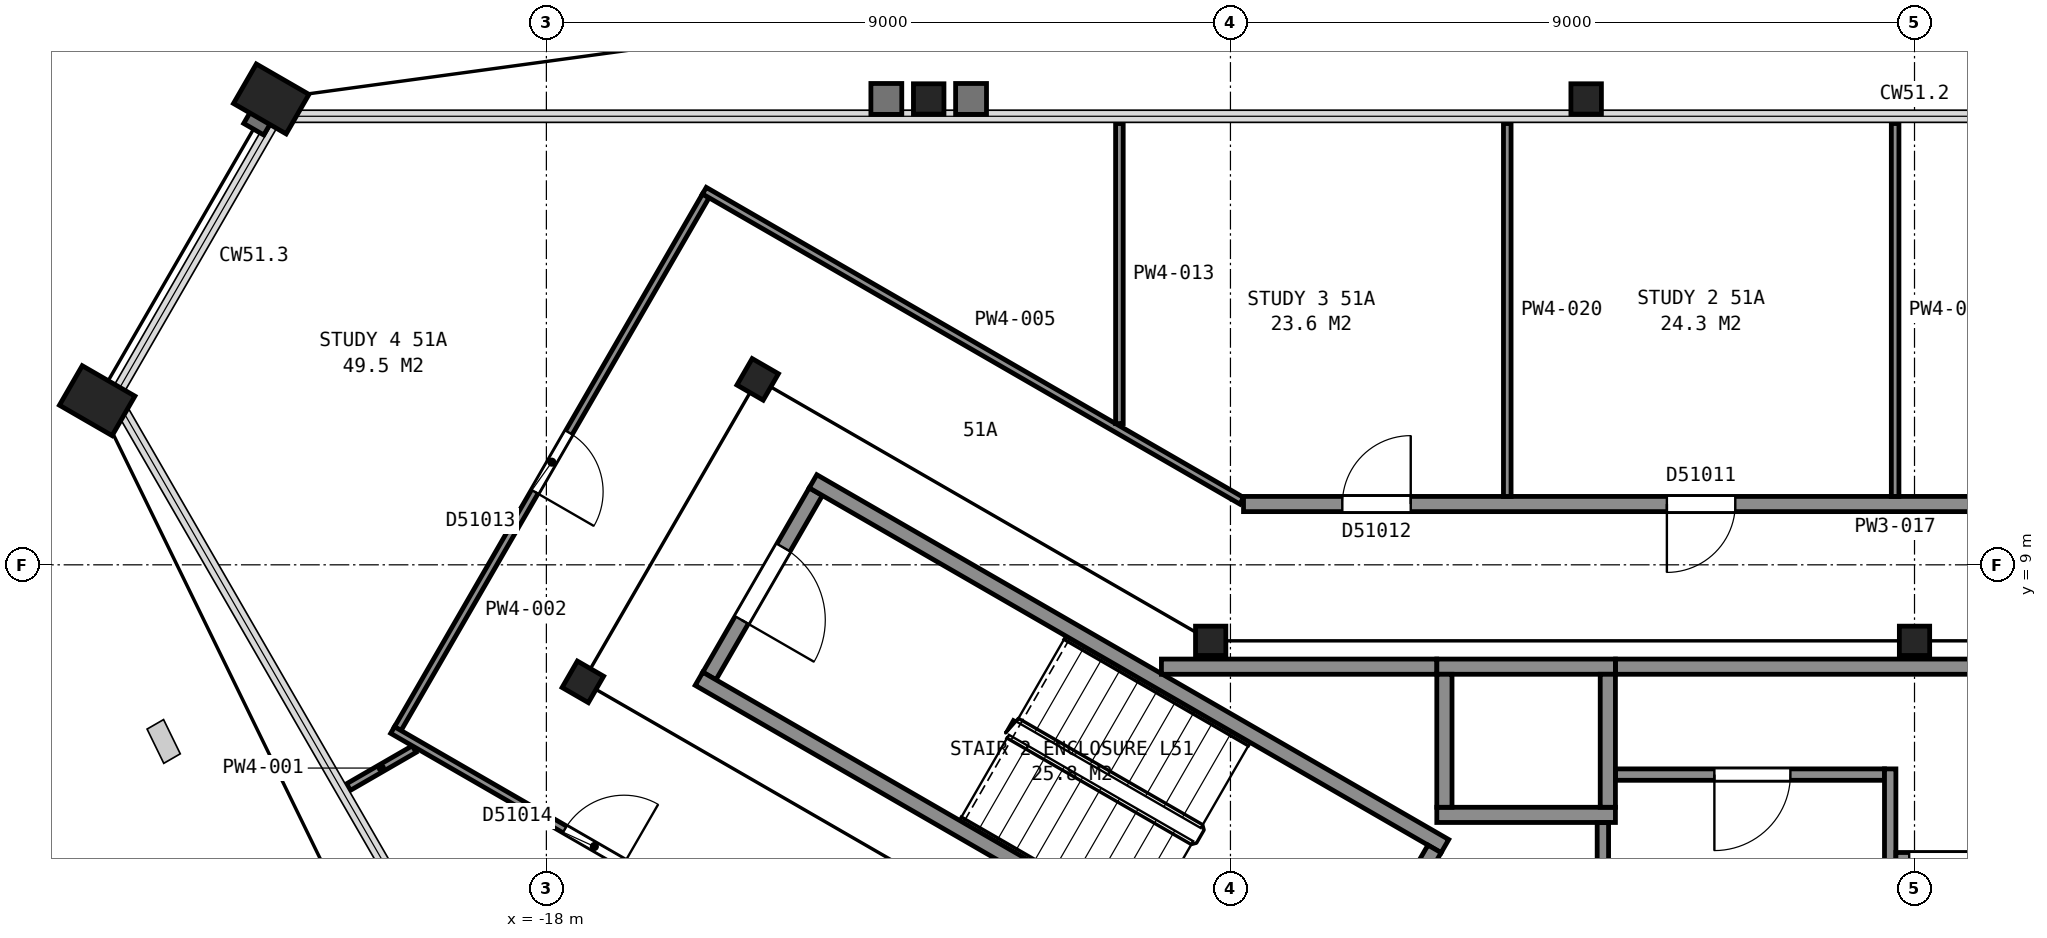
"""IFC4 building model, lengths in metres.
Left out: names, types, materials, properties, quantities, classifications, styles, units other than length and angle.
Written with IfcOpenShell. Run it as: python <this file> out.ifc"""

import sys

from ifc_helpers import new_model, si_unit, direction, frame, frame_2d, origin, origin_2d, place, context, subcontext, project, spatial, rectangle, hollow_rectangle, i_section, extrude, element, fill, save


model = new_model("IFC4")
c1 = context("Model", 3, precision=1e-05, world=origin(), true_north=direction((0.0, 1.0)))
c2 = subcontext(c1, "Body", "Model", "MODEL_VIEW")
j1 = project(units=[si_unit("LENGTHUNIT", "METRE"), si_unit("PLANEANGLEUNIT", "RADIAN")], contexts=[c1])
p1 = place(None, origin())
s1 = spatial("IfcSite", under=j1, at=p1, CompositionType="ELEMENT")
p2 = place(p1, origin())
s2 = spatial("IfcBuilding", under=s1, at=p2, CompositionType="ELEMENT")
p3 = place(p2, frame((0.0, 0.0, 206.4)))
s3 = spatial("IfcBuildingStorey", under=s2, at=p3, CompositionType="ELEMENT", Elevation=206.4)
for number, where, z_axis, x_axis in (
    (1, (-4.32, 15.13, 0.0), (0.0, 0.0, 1.0), (1.0, 0.0, 0.0)),
    (2, (-12.97, 15.13, 0.0), (0.0, 0.0, 1.0), (1.0, 0.0, 0.0)),
):
    element("IfcColumn", number, at=place(p3, frame(where, z_axis=z_axis, x_axis=x_axis)), inside=s3, PredefinedType="COLUMN", context=c2, shape_type="SweptSolid", body=[
        extrude(i_section(OverallWidth=0.401, OverallDepth=0.399, WebThickness=0.025, FlangeThickness=0.04, FilletRadius=0.015, at=origin_2d()), origin(), (0.0, 0.0, 1.0), 3.7),
    ])
for number, where, z_axis, x_axis in (
    (3, (-21.62, 15.13, 0.0), (0.0, 0.0, 1.0), (0.5, 0.866, 0.0)),
    (4, (-23.91, 11.16, 0.0), (0.0, 0.0, 1.0), (0.5, 0.866, 0.0)),
):
    element("IfcColumn", number, at=place(p3, frame(where, z_axis=z_axis, x_axis=x_axis)), inside=s3, PredefinedType="COLUMN", context=c2, shape_type="SweptSolid", body=[
        extrude(hollow_rectangle(XDim=0.6, YDim=0.8, WallThickness=0.05, at=origin_2d()), origin(), (0.0, 0.0, 1.0), 3.7),
    ])
for number, where, z_axis, x_axis in (
    (5, (0.0, 8.0, 0.0), (0.0, 0.0, 1.0), (1.0, 0.0, 0.0)),
    (6, (-9.26, 8.0, 0.0), (0.0, 0.0, 1.0), (1.0, 0.0, 0.0)),
):
    element("IfcColumn", number, at=place(p3, frame(where, z_axis=z_axis, x_axis=x_axis)), inside=s3, PredefinedType="COLUMN", context=c2, shape_type="SweptSolid", body=[
        extrude(i_section(OverallWidth=0.399, OverallDepth=0.386, WebThickness=0.021, FlangeThickness=0.033, FilletRadius=0.015, at=origin_2d()), origin(), (0.0, 0.0, 1.0), 3.7),
    ])
for number, where, z_axis, x_axis in (
    (7, (-15.22, 11.44, 0.0), (0.0, 0.0, 1.0), (0.5, 0.866, 0.0)),
    (8, (-17.52, 7.46, 0.0), (0.0, 0.0, 1.0), (0.5, 0.866, 0.0)),
):
    element("IfcColumn", number, at=place(p3, frame(where, z_axis=z_axis, x_axis=x_axis)), inside=s3, PredefinedType="COLUMN", context=c2, shape_type="SweptSolid", body=[
        extrude(i_section(OverallWidth=0.401, OverallDepth=0.399, WebThickness=0.025, FlangeThickness=0.04, FilletRadius=0.015, at=origin_2d()), origin(), (0.0, 0.0, 1.0), 3.7),
    ])
p4 = place(p3, frame((-14.455, 9.962, 0.0), z_axis=(0.0, 0.0, 1.0), x_axis=(-0.500049511043, -0.865996816683, 0.0)))
e9 = element("IfcWall", 9, at=p4, inside=s3, PredefinedType="PARTITIONING", context=c2, shape_type="SweptSolid", body=[
    extrude(rectangle(XDim=2.8, YDim=0.2, at=frame_2d((1.4, 0.0))), origin(), (0.0, 0.0, 1.0), 3.45),
])
p5 = place(p4, frame((0.85, 0.0, 0.0)))
e10 = element("IfcOpeningElement", 10, at=p5, cuts=e9, PredefinedType="OPENING", context=c2, shape_type="SweptSolid", body=[
    extrude(rectangle(XDim=1.1, YDim=2.1, at=frame_2d((0.55, 1.05))), frame((0.0, 0.11, 0.0), z_axis=(0.0, -1.0, 0.0), x_axis=(1.0, 0.0, 0.0)), (0.0, 0.0, 1.0), 0.22),
])
for number, where, z_axis, x_axis in (
    (11, (-7.678, 2.701, 0.0), (0.0, 0.0, 1.0), (-0.866, 0.5, 0.0)),
    (12, (-6.178, 5.299, 0.0), (0.0, 0.0, 1.0), (-0.866, 0.5, 0.0)),
):
    element("IfcWall", number, at=place(p3, frame(where, z_axis=z_axis, x_axis=x_axis)), inside=s3, PredefinedType="PARTITIONING", context=c2, shape_type="SweptSolid", body=[
        extrude(rectangle(XDim=9.6, YDim=0.2, at=frame_2d((4.8, 0.0))), origin(), (0.0, 0.0, 1.0), 3.45),
    ])
p6 = place(p3, frame((-6.315, 5.262, 0.0), z_axis=(0.0, 0.0, 1.0), x_axis=(-0.500049511043, -0.865996816683, 0.0)))
e13 = element("IfcWall", 13, at=p6, inside=s3, PredefinedType="PARTITIONING", context=c2, shape_type="SweptSolid", body=[
    extrude(rectangle(XDim=2.8, YDim=0.2, at=frame_2d((1.4, 0.0))), origin(), (0.0, 0.0, 1.0), 3.45),
])
for number, where, z_axis, x_axis in (
    (14, (-6.285, 5.71, 0.0), (0.0, 0.0, 1.0), (1.0, 0.0, 0.0)),
    (15, (-6.285, 7.66, 0.0), (0.0, 0.0, 1.0), (1.0, 0.0, 0.0)),
):
    element("IfcWall", number, at=place(p3, frame(where, z_axis=z_axis, x_axis=x_axis)), inside=s3, PredefinedType="PARTITIONING", context=c2, shape_type="SweptSolid", body=[
        extrude(rectangle(XDim=2.35, YDim=0.2, at=frame_2d((1.175, 0.0))), origin(), (0.0, 0.0, 1.0), 3.7),
    ])
for number, where, z_axis, x_axis in (
    (16, (-4.035, 5.81, 0.0), (0.0, 0.0, 1.0), (0.0, 1.0, 0.0)),
    (17, (-6.185, 5.81, 0.0), (0.0, 0.0, 1.0), (0.0, 1.0, 0.0)),
):
    element("IfcWall", number, at=place(p3, frame(where, z_axis=z_axis, x_axis=x_axis)), inside=s3, PredefinedType="PARTITIONING", context=c2, shape_type="SweptSolid", body=[
        extrude(rectangle(XDim=1.75, YDim=0.2, at=frame_2d((0.875, 0.0))), origin(), (0.0, 0.0, 1.0), 3.7),
    ])
p7 = place(p3, frame((-9.908, 7.66, 0.0), z_axis=(0.0, 0.0, 1.0), x_axis=(1.0, 0.0, 0.0)))
e18 = element("IfcWall", 18, at=p7, inside=s3, PredefinedType="PARTITIONING", context=c2, shape_type="SweptSolid", body=[
    extrude(rectangle(XDim=3.621, YDim=0.2, at=frame_2d((1.811, 0.0))), origin(), (0.0, 0.0, 1.0), 3.45),
])
p8 = place(p3, frame((-4.1, 2.085, 0.0), z_axis=(0.0, 0.0, 1.0), x_axis=(0.0, 1.0, 0.0)))
e19 = element("IfcWall", 19, at=p8, inside=s3, PredefinedType="PARTITIONING", context=c2, shape_type="SweptSolid", body=[
    extrude(rectangle(XDim=3.523, YDim=0.15, at=frame_2d((1.761, 0.0))), origin(), (0.0, 0.0, 1.0), 3.45),
])
p9 = place(p3, frame((-3.933, 6.24, 0.0), z_axis=(0.0, 0.0, 1.0), x_axis=(1.0, 0.0, 0.0)))
e20 = element("IfcWall", 20, at=p9, inside=s3, PredefinedType="PARTITIONING", context=c2, shape_type="SweptSolid", body=[
    extrude(rectangle(XDim=3.538, YDim=0.15, at=frame_2d((1.769, 0.0))), origin(), (0.0, 0.0, 1.0), 3.45),
])
p10 = place(p9, frame((1.3, 0.0, 0.0)))
e21 = element("IfcOpeningElement", 21, at=p10, cuts=e20, PredefinedType="OPENING", context=c2, shape_type="SweptSolid", body=[
    extrude(rectangle(XDim=1.0, YDim=2.1, at=frame_2d((0.5, 1.05))), frame((0.0, 0.085, 0.0), z_axis=(0.0, -1.0, 0.0), x_axis=(1.0, 0.0, 0.0)), (0.0, 0.0, 1.0), 0.17),
])
p11 = place(p3, frame((-3.933, 7.66, 0.0), z_axis=(0.0, 0.0, 1.0), x_axis=(1.0, 0.0, 0.0)))
e22 = element("IfcWall", 22, at=p11, inside=s3, PredefinedType="PARTITIONING", context=c2, shape_type="SweptSolid", body=[
    extrude(rectangle(XDim=13.841, YDim=0.2, at=frame_2d((6.92, 0.0))), origin(), (0.0, 0.0, 1.0), 3.45),
])
p12 = place(p3, frame((-0.32, 2.252, 0.0), z_axis=(0.0, 0.0, 1.0), x_axis=(0.0, 1.0, 0.0)))
e23 = element("IfcWall", 23, at=p12, inside=s3, PredefinedType="PARTITIONING", context=c2, shape_type="SweptSolid", body=[
    extrude(rectangle(XDim=4.063, YDim=0.15, at=frame_2d((2.031, 0.0))), origin(), (0.0, 0.0, 1.0), 3.45),
])
p13 = place(p3, frame((-0.245, 5.14, 0.0), z_axis=(0.0, 0.0, 1.0), x_axis=(1.0, 0.0, 0.0)))
e24 = element("IfcWall", 24, at=p13, inside=s3, PredefinedType="PARTITIONING", context=c2, shape_type="SweptSolid", body=[
    extrude(rectangle(XDim=5.11, YDim=0.15, at=frame_2d((2.555, 0.0))), origin(), (0.0, 0.0, 1.0), 3.45),
])
p14 = place(p13, frame((0.175, 0.0, 0.0)))
e25 = element("IfcOpeningElement", 25, at=p14, cuts=e24, PredefinedType="OPENING", context=c2, shape_type="SweptSolid", body=[
    extrude(rectangle(XDim=1.0, YDim=2.1, at=frame_2d((0.5, 1.05))), frame((0.0, 0.085, 0.0), z_axis=(0.0, -1.0, 0.0), x_axis=(1.0, 0.0, 0.0)), (0.0, 0.0, 1.0), 0.17),
])
p15 = place(p3, frame((-20.604, 6.076, 0.0), z_axis=(0.0, 0.0, 1.0), x_axis=(0.865855657918, 0.500293893279, 0.0)))
e26 = element("IfcWall", 26, at=p15, inside=s3, PredefinedType="PARTITIONING", context=c2, shape_type="SweptSolid", body=[
    extrude(rectangle(XDim=0.999, YDim=0.1, at=frame_2d((0.499, 0.0))), origin(), (0.0, 0.0, 1.0), 2.713),
])
p16 = place(p3, frame((-19.955, 6.844, 0.0), z_axis=(0.0, 0.0, 1.0), x_axis=(0.500415732313, 0.865785247537, 0.0)))
e27 = element("IfcWall", 27, at=p16, inside=s3, PredefinedType="PARTITIONING", context=c2, shape_type="SweptSolid", body=[
    extrude(rectangle(XDim=8.097, YDim=0.1, at=frame_2d((4.049, 0.0))), origin(), (0.0, 0.0, 1.0), 2.713),
])
p17 = place(p16, frame((3.6, 0.0, 0.0)))
e28 = element("IfcOpeningElement", 28, at=p17, cuts=e27, PredefinedType="OPENING", context=c2, shape_type="SweptSolid", body=[
    extrude(rectangle(XDim=0.9, YDim=2.1, at=frame_2d((0.45, 1.05))), frame((0.0, 0.06, 0.0), z_axis=(0.0, -1.0, 0.0), x_axis=(1.0, 0.0, 0.0)), (0.0, 0.0, 1.0), 0.12),
])
p18 = place(p3, frame((-12.952, 2.744, 0.0), z_axis=(0.0, 0.0, 1.0), x_axis=(-0.86608949446, 0.499888975259, 0.0)))
e29 = element("IfcWall", 29, at=p18, inside=s3, PredefinedType="PARTITIONING", context=c2, shape_type="SweptSolid", body=[
    extrude(rectangle(XDim=8.165, YDim=0.1, at=frame_2d((4.083, 0.0))), origin(), (0.0, 0.0, 1.0), 2.713),
])
p19 = place(p18, frame((4.65, 0.0, 0.0)))
e30 = element("IfcOpeningElement", 30, at=p19, cuts=e29, PredefinedType="OPENING", context=c2, shape_type="SweptSolid", body=[
    extrude(rectangle(XDim=0.9, YDim=2.1, at=frame_2d((0.45, 1.05))), frame((0.0, 0.06, 0.0), z_axis=(0.0, -1.0, 0.0), x_axis=(1.0, 0.0, 0.0)), (0.0, 0.0, 1.0), 0.12),
])
p20 = place(p18, frame((0.746, 0.0, 0.0)))
e31 = element("IfcOpeningElement", 31, at=p20, cuts=e29, PredefinedType="OPENING", context=c2, shape_type="SweptSolid", body=[
    extrude(rectangle(XDim=0.9, YDim=2.1, at=frame_2d((0.45, 1.05))), frame((0.0, 0.06, 0.0), z_axis=(0.0, -1.0, 0.0), x_axis=(1.0, 0.0, 0.0)), (0.0, 0.0, 1.0), 0.12),
])
p21 = place(p3, frame((-15.921, 13.923, 0.0), z_axis=(0.0, 0.0, 1.0), x_axis=(0.866088973199, -0.499889878377, 0.0)))
e32 = element("IfcWall", 32, at=p21, inside=s3, PredefinedType="PARTITIONING", context=c2, shape_type="SweptSolid", body=[
    extrude(rectangle(XDim=8.163, YDim=0.1, at=frame_2d((4.082, 0.0))), origin(), (0.0, 0.0, 1.0), 2.713),
])
p22 = place(p3, frame((-10.461, 10.859, 0.0), z_axis=(0.0, 0.0, 1.0), x_axis=(0.0, 1.0, 0.0)))
e33 = element("IfcWall", 33, at=p22, inside=s3, PredefinedType="PARTITIONING", context=c2, shape_type="SweptSolid", body=[
    extrude(rectangle(XDim=3.947, YDim=0.1, at=frame_2d((1.974, 0.0))), origin(), (0.0, 0.0, 1.0), 2.713),
])
p23 = place(p3, frame((-8.828, 9.8, 0.0), z_axis=(0.0, 0.0, 1.0), x_axis=(1.0, 0.0, 0.0)))
e34 = element("IfcWall", 34, at=p23, inside=s3, PredefinedType="PARTITIONING", context=c2, shape_type="SweptSolid", body=[
    extrude(rectangle(XDim=17.706, YDim=0.2, at=frame_2d((8.853, 0.0))), origin(), (0.0, 0.0, 1.0), 2.713),
])
p24 = place(p23, frame((14.976, 0.0, 0.0)))
e35 = element("IfcOpeningElement", 35, at=p24, cuts=e34, PredefinedType="OPENING", context=c2, shape_type="SweptSolid", body=[
    extrude(rectangle(XDim=0.9, YDim=2.1, at=frame_2d((0.45, 1.05))), frame((0.0, 0.11, 0.0), z_axis=(0.0, -1.0, 0.0), x_axis=(1.0, 0.0, 0.0)), (0.0, 0.0, 1.0), 0.22),
])
p25 = place(p23, frame((10.673, 0.0, 0.0)))
e36 = element("IfcOpeningElement", 36, at=p25, cuts=e34, PredefinedType="OPENING", context=c2, shape_type="SweptSolid", body=[
    extrude(rectangle(XDim=0.9, YDim=2.1, at=frame_2d((0.45, 1.05))), frame((0.0, 0.11, 0.0), z_axis=(0.0, -1.0, 0.0), x_axis=(1.0, 0.0, 0.0)), (0.0, 0.0, 1.0), 0.22),
])
p26 = place(p23, frame((5.57, 0.0, 0.0)))
e37 = element("IfcOpeningElement", 37, at=p26, cuts=e34, PredefinedType="OPENING", context=c2, shape_type="SweptSolid", body=[
    extrude(rectangle(XDim=0.9, YDim=2.1, at=frame_2d((0.45, 1.05))), frame((0.0, 0.11, 0.0), z_axis=(0.0, -1.0, 0.0), x_axis=(1.0, 0.0, 0.0)), (0.0, 0.0, 1.0), 0.22),
])
p27 = place(p23, frame((1.3, 0.0, 0.0)))
e38 = element("IfcOpeningElement", 38, at=p27, cuts=e34, PredefinedType="OPENING", context=c2, shape_type="SweptSolid", body=[
    extrude(rectangle(XDim=0.9, YDim=2.1, at=frame_2d((0.45, 1.05))), frame((0.0, 0.11, 0.0), z_axis=(0.0, -1.0, 0.0), x_axis=(1.0, 0.0, 0.0)), (0.0, 0.0, 1.0), 0.22),
])
for number, where, z_axis, x_axis in (
    (39, (-5.358, 9.9, 0.0), (0.0, 0.0, 1.0), (0.0, 1.0, 0.0)),
    (40, (-0.255, 9.9, 0.0), (0.0, 0.0, 1.0), (0.0, 1.0, 0.0)),
):
    element("IfcWall", number, at=place(p3, frame(where, z_axis=z_axis, x_axis=x_axis)), inside=s3, PredefinedType="PARTITIONING", context=c2, shape_type="SweptSolid", body=[
        extrude(rectangle(XDim=4.906, YDim=0.1, at=frame_2d((2.453, 0.0))), origin(), (0.0, 0.0, 1.0), 2.713),
    ])
p28 = place(p5, origin())
e41 = element("IfcDoor", 41, at=p28, inside=s3, OperationType="SINGLE_SWING_RIGHT", PredefinedType="DOOR", context=c2, shape_type="SweptSolid", body=[
    extrude(rectangle(XDim=1.1, YDim=2.1, at=frame_2d((0.55, 1.05))), frame((0.0, 0.025, 0.0), z_axis=(0.0, -1.0, 0.0), x_axis=(1.0, 0.0, 0.0)), (0.0, 0.0, 1.0), 0.05),
])
fill(e10, e41)
p29 = place(p10, origin())
e42 = element("IfcDoor", 42, at=p29, inside=s3, OperationType="SINGLE_SWING_LEFT", PredefinedType="DOOR", context=c2, shape_type="SweptSolid", body=[
    extrude(rectangle(XDim=1.0, YDim=2.1, at=frame_2d((0.5, 1.05))), frame((0.0, 0.025, 0.0), z_axis=(0.0, -1.0, 0.0), x_axis=(1.0, 0.0, 0.0)), (0.0, 0.0, 1.0), 0.05),
])
fill(e21, e42)
p30 = place(p14, origin())
e43 = element("IfcDoor", 43, at=p30, inside=s3, OperationType="SINGLE_SWING_LEFT", PredefinedType="DOOR", context=c2, shape_type="SweptSolid", body=[
    extrude(rectangle(XDim=1.0, YDim=2.1, at=frame_2d((0.5, 1.05))), frame((0.0, 0.025, 0.0), z_axis=(0.0, -1.0, 0.0), x_axis=(1.0, 0.0, 0.0)), (0.0, 0.0, 1.0), 0.05),
])
fill(e25, e43)
p31 = place(p17, origin())
e44 = element("IfcDoor", 44, at=p31, inside=s3, OperationType="SINGLE_SWING_LEFT", PredefinedType="DOOR", context=c2, shape_type="SweptSolid", body=[
    extrude(rectangle(XDim=0.9, YDim=2.1, at=frame_2d((0.45, 1.05))), frame((0.0, 0.025, 0.0), z_axis=(0.0, -1.0, 0.0), x_axis=(1.0, 0.0, 0.0)), (0.0, 0.0, 1.0), 0.05),
])
fill(e28, e44)
p32 = place(p19, origin())
e45 = element("IfcDoor", 45, at=p32, inside=s3, OperationType="SINGLE_SWING_LEFT", PredefinedType="DOOR", context=c2, shape_type="SweptSolid", body=[
    extrude(rectangle(XDim=0.9, YDim=2.1, at=frame_2d((0.45, 1.05))), frame((0.0, 0.025, 0.0), z_axis=(0.0, -1.0, 0.0), x_axis=(1.0, 0.0, 0.0)), (0.0, 0.0, 1.0), 0.05),
])
fill(e30, e45)
p33 = place(p26, origin())
e46 = element("IfcDoor", 46, at=p33, inside=s3, OperationType="SINGLE_SWING_LEFT", PredefinedType="DOOR", context=c2, shape_type="SweptSolid", body=[
    extrude(rectangle(XDim=0.9, YDim=2.1, at=frame_2d((0.45, 1.05))), frame((0.0, 0.025, 0.0), z_axis=(0.0, -1.0, 0.0), x_axis=(1.0, 0.0, 0.0)), (0.0, 0.0, 1.0), 0.05),
])
fill(e37, e46)
p34 = place(p27, origin())
e47 = element("IfcDoor", 47, at=p34, inside=s3, OperationType="SINGLE_SWING_RIGHT", PredefinedType="DOOR", context=c2, shape_type="SweptSolid", body=[
    extrude(rectangle(XDim=0.9, YDim=2.1, at=frame_2d((0.45, 1.05))), frame((0.0, 0.025, 0.0), z_axis=(0.0, -1.0, 0.0), x_axis=(1.0, 0.0, 0.0)), (0.0, 0.0, 1.0), 0.05),
])
fill(e38, e47)
save(model, sys.argv[1])
